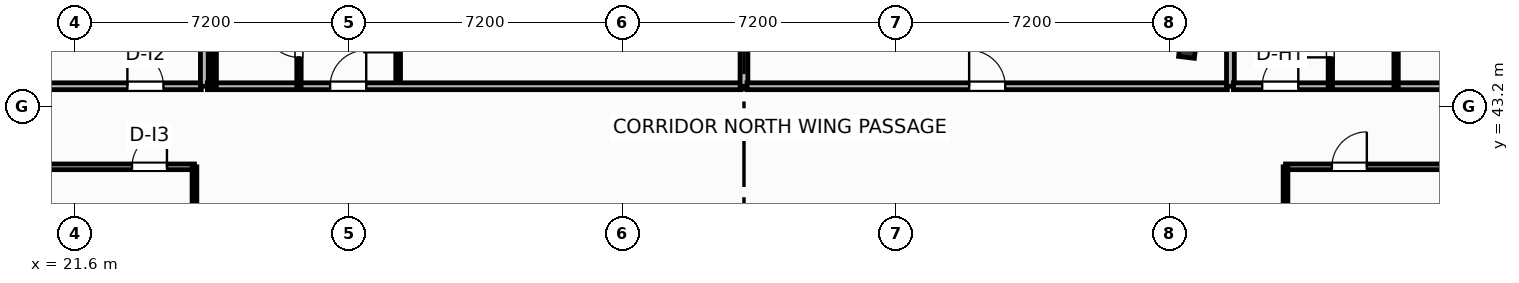
"""IFC4 building model, lengths in metres.
Left out: names, types, materials, properties, quantities, classifications, styles, units other than length and angle.
Written with IfcOpenShell. Run it as: python <this file> out.ifc"""

import sys

from ifc_helpers import new_model, si_unit, direction, frame, frame_2d, origin, origin_2d, place, context, subcontext, project, spatial, rectangle, i_section, extrude, element, fill, save


model = new_model("IFC4")
c1 = context("Model", 3, precision=1e-05, world=origin(), true_north=direction((0.0, 1.0)))
c2 = subcontext(c1, "Body", "Model", "MODEL_VIEW")
j1 = project(units=[si_unit("LENGTHUNIT", "METRE"), si_unit("PLANEANGLEUNIT", "RADIAN")], contexts=[c1])
p1 = place(None, origin())
s1 = spatial("IfcSite", under=j1, at=p1, CompositionType="ELEMENT")
p2 = place(p1, origin())
s2 = spatial("IfcBuilding", under=s1, at=p2, CompositionType="ELEMENT")
p3 = place(p2, frame((0.0, 0.0, 147.6)))
s3 = spatial("IfcBuildingStorey", under=s2, at=p3, CompositionType="ELEMENT", Elevation=147.6)
p4 = place(p3, frame((50.872, 44.717, 0.0), z_axis=(0.0, 0.0, 1.0), x_axis=(0.992732158755, -0.12034475881, 0.0)))
e1 = element("IfcColumn", 1, at=p4, inside=s3, PredefinedType="COLUMN", context=c2, shape_type="SweptSolid", body=[
    extrude(i_section(OverallWidth=0.418, OverallDepth=0.455, WebThickness=0.042, FlangeThickness=0.068, FilletRadius=0.025, at=origin_2d()), origin(), (0.0, 0.0, 1.0), 3.7),
])
p5 = place(p3, frame((73.538, 44.588, 0.0), z_axis=(0.0, 0.0, 1.0), x_axis=(-0.992733493583, 0.120333747213, 0.0)))
e2 = element("IfcWall", 2, at=p5, inside=s3, PredefinedType="SOLIDWALL", context=c2, shape_type="SweptSolid", body=[
    extrude(rectangle(XDim=21.447, YDim=0.22, at=frame_2d((10.724, 0.0))), origin(), (0.0, 0.0, 1.0), 2.73),
])
p6 = place(p5, frame((9.899, 0.0, 0.8)))
e3 = element("IfcOpeningElement", 3, at=p6, cuts=e2, PredefinedType="OPENING", context=c2, shape_type="SweptSolid", body=[
    extrude(rectangle(XDim=1.65, YDim=1.65, at=frame_2d((0.825, 0.825))), frame((0.0, 0.12, 0.0), z_axis=(0.0, -1.0, 0.0), x_axis=(1.0, 0.0, 0.0)), (0.0, 0.0, 1.0), 0.24),
])
p7 = place(p3, frame((5.0, 41.61, 0.0), z_axis=(0.0, 0.0, 1.0), x_axis=(1.0, 0.0, 0.0)))
e4 = element("IfcWall", 4, at=p7, inside=s3, PredefinedType="PARTITIONING", context=c2, shape_type="SweptSolid", body=[
    extrude(rectangle(XDim=19.74, YDim=0.15, at=frame_2d((9.87, 0.0))), origin(), (0.0, 0.0, 1.0), 3.45),
])
p8 = place(p7, frame((18.096, 0.0, 0.0)))
e5 = element("IfcOpeningElement", 5, at=p8, cuts=e4, PredefinedType="OPENING", context=c2, shape_type="SweptSolid", body=[
    extrude(rectangle(XDim=0.92, YDim=2.05, at=frame_2d((0.46, 1.025))), frame((0.0, 0.085, 0.0), z_axis=(0.0, -1.0, 0.0), x_axis=(1.0, 0.0, 0.0)), (0.0, 0.0, 1.0), 0.17),
])
p9 = place(p3, frame((24.74, 39.3, 0.0), z_axis=(0.0, 0.0, 1.0), x_axis=(0.0, 1.0, 0.0)))
e6 = element("IfcWall", 6, at=p9, inside=s3, PredefinedType="PARTITIONING", context=c2, shape_type="SweptSolid", body=[
    extrude(rectangle(XDim=2.31, YDim=0.125, at=frame_2d((1.155, 0.0))), origin(), (0.0, 0.0, 1.0), 3.45),
])
p10 = place(p3, frame((53.45, 41.61, 0.0), z_axis=(0.0, 0.0, 1.0), x_axis=(1.0, 0.0, 0.0)))
e7 = element("IfcWall", 7, at=p10, inside=s3, PredefinedType="PARTITIONING", context=c2, shape_type="SweptSolid", body=[
    extrude(rectangle(XDim=16.55, YDim=0.15, at=frame_2d((8.275, 0.0))), origin(), (0.0, 0.0, 1.0), 3.45),
])
p11 = place(p10, frame((1.22, 0.0, 0.0)))
e8 = element("IfcOpeningElement", 8, at=p11, cuts=e7, PredefinedType="OPENING", context=c2, shape_type="SweptSolid", body=[
    extrude(rectangle(XDim=0.92, YDim=2.05, at=frame_2d((0.46, 1.025))), frame((0.0, 0.085, 0.0), z_axis=(0.0, -1.0, 0.0), x_axis=(1.0, 0.0, 0.0)), (0.0, 0.0, 1.0), 0.17),
])
p12 = place(p3, frame((53.45, 39.3, 0.0), z_axis=(0.0, 0.0, 1.0), x_axis=(0.0, 1.0, 0.0)))
e9 = element("IfcWall", 9, at=p12, inside=s3, PredefinedType="PARTITIONING", context=c2, shape_type="SweptSolid", body=[
    extrude(rectangle(XDim=2.31, YDim=0.125, at=frame_2d((1.155, 0.0))), origin(), (0.0, 0.0, 1.0), 3.45),
])
p13 = place(p3, frame((4.143, 43.73, 0.0), z_axis=(0.0, 0.0, 1.0), x_axis=(1.0, 0.0, 0.0)))
e10 = element("IfcWall", 10, at=p13, inside=s3, PredefinedType="PARTITIONING", context=c2, shape_type="SweptSolid", body=[
    extrude(rectangle(XDim=20.777, YDim=0.18, at=frame_2d((10.389, 0.0))), origin(), (0.0, 0.0, 1.0), 3.45),
])
p14 = place(p13, frame((18.832, 0.0, 0.0)))
e11 = element("IfcOpeningElement", 11, at=p14, cuts=e10, PredefinedType="OPENING", context=c2, shape_type="SweptSolid", body=[
    extrude(rectangle(XDim=0.95, YDim=2.05, at=frame_2d((0.475, 1.025))), frame((0.0, 0.1, 0.0), z_axis=(0.0, -1.0, 0.0), x_axis=(1.0, 0.0, 0.0)), (0.0, 0.0, 1.0), 0.2),
])
p15 = place(p3, frame((25.0, 43.73, 0.0), z_axis=(0.0, 0.0, 1.0), x_axis=(0.0, 1.0, 0.0)))
e12 = element("IfcWall", 12, at=p15, inside=s3, PredefinedType="PARTITIONING", context=c2, shape_type="SweptSolid", body=[
    extrude(rectangle(XDim=6.722, YDim=0.205, at=frame_2d((3.361, 0.0))), origin(), (0.0, 0.0, 1.0), 3.45),
])
p16 = place(p3, frame((30.1, 43.73, 0.0), z_axis=(0.0, 0.0, 1.0), x_axis=(0.0, 1.0, 0.0)))
e13 = element("IfcWall", 13, at=p16, inside=s3, PredefinedType="PARTITIONING", context=c2, shape_type="SweptSolid", body=[
    extrude(rectangle(XDim=6.104, YDim=0.125, at=frame_2d((3.052, 0.0))), origin(), (0.0, 0.0, 1.0), 3.45),
])
p17 = place(p16, frame((0.895, 0.0, 0.0)))
e14 = element("IfcOpeningElement", 14, at=p17, cuts=e13, PredefinedType="OPENING", context=c2, shape_type="SweptSolid", body=[
    extrude(rectangle(XDim=0.92, YDim=2.05, at=frame_2d((0.46, 1.025))), frame((0.0, 0.073, 0.0), z_axis=(0.0, -1.0, 0.0), x_axis=(1.0, 0.0, 0.0)), (0.0, 0.0, 1.0), 0.145),
])
p18 = place(p3, frame((25.08, 43.73, 0.0), z_axis=(0.0, 0.0, 1.0), x_axis=(1.0, 0.0, 0.0)))
e15 = element("IfcWall", 15, at=p18, inside=s3, PredefinedType="PARTITIONING", context=c2, shape_type="SweptSolid", body=[
    extrude(rectangle(XDim=14.04, YDim=0.18, at=frame_2d((7.02, 0.0))), origin(), (0.0, 0.0, 1.0), 2.972),
])
p19 = place(p18, frame((3.23, 0.0, 0.0)))
e16 = element("IfcOpeningElement", 16, at=p19, cuts=e15, PredefinedType="OPENING", context=c2, shape_type="SweptSolid", body=[
    extrude(rectangle(XDim=0.95, YDim=2.15, at=frame_2d((0.475, 1.075))), frame((0.0, 0.1, 0.0), z_axis=(0.0, -1.0, 0.0), x_axis=(1.0, 0.0, 0.0)), (0.0, 0.0, 1.0), 0.2),
])
p20 = place(p3, frame((27.49, 43.73, 0.0), z_axis=(0.0, 0.0, 1.0), x_axis=(0.0, 1.0, 0.0)))
e17 = element("IfcWall", 17, at=p20, inside=s3, PredefinedType="PARTITIONING", context=c2, shape_type="SweptSolid", body=[
    extrude(rectangle(XDim=2.52, YDim=0.115, at=frame_2d((1.26, 0.0))), origin(), (0.0, 0.0, 1.0), 3.45),
])
p21 = place(p20, frame((0.76, 0.0, 0.0)))
e18 = element("IfcOpeningElement", 18, at=p21, cuts=e17, PredefinedType="OPENING", context=c2, shape_type="SweptSolid", body=[
    extrude(rectangle(XDim=0.9, YDim=2.05, at=frame_2d((0.45, 1.025))), frame((0.0, 0.067, 0.0), z_axis=(0.0, -1.0, 0.0), x_axis=(1.0, 0.0, 0.0)), (0.0, 0.0, 1.0), 0.135),
])
p22 = place(p3, frame((25.26, 43.73, 0.0), z_axis=(0.0, 0.0, 1.0), x_axis=(0.0, 1.0, 0.0)))
e19 = element("IfcWall", 19, at=p22, inside=s3, PredefinedType="PARTITIONING", context=c2, shape_type="SweptSolid", body=[
    extrude(rectangle(XDim=2.52, YDim=0.115, at=frame_2d((1.26, 0.0))), origin(), (0.0, 0.0, 1.0), 3.45),
])
p23 = place(p3, frame((39.2, 43.73, 0.0), z_axis=(0.0, 0.0, 1.0), x_axis=(0.0, 1.0, 0.0)))
e20 = element("IfcWall", 20, at=p23, inside=s3, PredefinedType="PARTITIONING", context=c2, shape_type="SweptSolid", body=[
    extrude(rectangle(XDim=5.0, YDim=0.205, at=frame_2d((2.5, 0.0))), origin(), (0.0, 0.0, 1.0), 3.45),
])
p24 = place(p3, frame((39.28, 43.73, 0.0), z_axis=(0.0, 0.0, 1.0), x_axis=(1.0, 0.0, 0.0)))
e21 = element("IfcWall", 21, at=p24, inside=s3, PredefinedType="PARTITIONING", context=c2, shape_type="SweptSolid", body=[
    extrude(rectangle(XDim=12.64, YDim=0.18, at=frame_2d((6.32, 0.0))), origin(), (0.0, 0.0, 1.0), 2.972),
])
p25 = place(p24, frame((5.845, 0.0, 0.0)))
e22 = element("IfcOpeningElement", 22, at=p25, cuts=e21, PredefinedType="OPENING", context=c2, shape_type="SweptSolid", body=[
    extrude(rectangle(XDim=0.95, YDim=2.05, at=frame_2d((0.475, 1.025))), frame((0.0, 0.1, 0.0), z_axis=(0.0, -1.0, 0.0), x_axis=(1.0, 0.0, 0.0)), (0.0, 0.0, 1.0), 0.2),
])
p26 = place(p3, frame((52.0, 43.73, 0.0), z_axis=(0.0, 0.0, 1.0), x_axis=(0.0, 1.0, 0.0)))
e23 = element("IfcWall", 23, at=p26, inside=s3, PredefinedType="PARTITIONING", context=c2, shape_type="SweptSolid", body=[
    extrude(rectangle(XDim=1.354, YDim=0.205, at=frame_2d((0.677, 0.0))), origin(), (0.0, 0.0, 1.0), 3.45),
])
p27 = place(p3, frame((52.08, 43.73, 0.0), z_axis=(0.0, 0.0, 1.0), x_axis=(1.0, 0.0, 0.0)))
e24 = element("IfcWall", 24, at=p27, inside=s3, PredefinedType="PARTITIONING", context=c2, shape_type="SweptSolid", body=[
    extrude(rectangle(XDim=23.689, YDim=0.18, at=frame_2d((11.845, 0.0))), origin(), (0.0, 0.0, 1.0), 2.824),
])
p28 = place(p27, frame((0.756, 0.0, 0.0)))
e25 = element("IfcOpeningElement", 25, at=p28, cuts=e24, PredefinedType="OPENING", context=c2, shape_type="SweptSolid", body=[
    extrude(rectangle(XDim=0.95, YDim=2.15, at=frame_2d((0.475, 1.075))), frame((0.0, 0.1, 0.0), z_axis=(0.0, -1.0, 0.0), x_axis=(1.0, 0.0, 0.0)), (0.0, 0.0, 1.0), 0.2),
])
p29 = place(p3, frame((54.63, 43.73, 0.0), z_axis=(0.0, 0.0, 1.0), x_axis=(0.0, 1.0, 0.0)))
e26 = element("IfcWall", 26, at=p29, inside=s3, PredefinedType="PARTITIONING", context=c2, shape_type="SweptSolid", body=[
    extrude(rectangle(XDim=2.52, YDim=0.115, at=frame_2d((1.26, 0.0))), origin(), (0.0, 0.0, 1.0), 3.45),
])
p30 = place(p29, frame((0.76, 0.0, 0.0)))
e27 = element("IfcOpeningElement", 27, at=p30, cuts=e26, PredefinedType="OPENING", context=c2, shape_type="SweptSolid", body=[
    extrude(rectangle(XDim=0.9, YDim=2.05, at=frame_2d((0.45, 1.025))), frame((0.0, 0.067, 0.0), z_axis=(0.0, -1.0, 0.0), x_axis=(1.0, 0.0, 0.0)), (0.0, 0.0, 1.0), 0.135),
])
p31 = place(p3, frame((56.36, 43.73, 0.0), z_axis=(0.0, 0.0, 1.0), x_axis=(0.0, 1.0, 0.0)))
e28 = element("IfcWall", 28, at=p31, inside=s3, PredefinedType="PARTITIONING", context=c2, shape_type="SweptSolid", body=[
    extrude(rectangle(XDim=2.52, YDim=0.115, at=frame_2d((1.26, 0.0))), origin(), (0.0, 0.0, 1.0), 3.45),
])
p32 = place(p8, origin())
e29 = element("IfcDoor", 29, at=p32, inside=s3, OperationType="SINGLE_SWING_RIGHT", PredefinedType="DOOR", context=c2, shape_type="SweptSolid", body=[
    extrude(rectangle(XDim=0.92, YDim=2.05, at=frame_2d((0.46, 1.025))), frame((0.0, 0.025, 0.0), z_axis=(0.0, -1.0, 0.0), x_axis=(1.0, 0.0, 0.0)), (0.0, 0.0, 1.0), 0.05),
])
fill(e5, e29)
p33 = place(p11, origin())
e30 = element("IfcDoor", 30, at=p33, inside=s3, OperationType="SINGLE_SWING_RIGHT", PredefinedType="DOOR", context=c2, shape_type="SweptSolid", body=[
    extrude(rectangle(XDim=0.92, YDim=2.05, at=frame_2d((0.46, 1.025))), frame((0.0, 0.025, 0.0), z_axis=(0.0, -1.0, 0.0), x_axis=(1.0, 0.0, 0.0)), (0.0, 0.0, 1.0), 0.05),
])
fill(e8, e30)
p34 = place(p14, origin())
e31 = element("IfcDoor", 31, at=p34, inside=s3, OperationType="SINGLE_SWING_LEFT", PredefinedType="DOOR", context=c2, shape_type="SweptSolid", body=[
    extrude(rectangle(XDim=0.95, YDim=2.05, at=frame_2d((0.475, 1.025))), frame((0.0, 0.025, 0.0), z_axis=(0.0, -1.0, 0.0), x_axis=(1.0, 0.0, 0.0)), (0.0, 0.0, 1.0), 0.05),
])
fill(e11, e31)
p35 = place(p17, origin())
e32 = element("IfcDoor", 32, at=p35, inside=s3, OperationType="SINGLE_SWING_LEFT", PredefinedType="DOOR", context=c2, shape_type="SweptSolid", body=[
    extrude(rectangle(XDim=0.92, YDim=2.05, at=frame_2d((0.46, 1.025))), frame((0.0, 0.025, 0.0), z_axis=(0.0, -1.0, 0.0), x_axis=(1.0, 0.0, 0.0)), (0.0, 0.0, 1.0), 0.05),
])
fill(e14, e32)
p36 = place(p19, origin())
e33 = element("IfcDoor", 33, at=p36, inside=s3, OperationType="SINGLE_SWING_RIGHT", PredefinedType="DOOR", context=c2, shape_type="SweptSolid", body=[
    extrude(rectangle(XDim=0.95, YDim=2.15, at=frame_2d((0.475, 1.075))), frame((0.0, 0.025, 0.0), z_axis=(0.0, -1.0, 0.0), x_axis=(1.0, 0.0, 0.0)), (0.0, 0.0, 1.0), 0.05),
])
fill(e16, e33)
p37 = place(p21, origin())
e34 = element("IfcDoor", 34, at=p37, inside=s3, OperationType="SINGLE_SWING_RIGHT", PredefinedType="DOOR", context=c2, shape_type="SweptSolid", body=[
    extrude(rectangle(XDim=0.9, YDim=2.05, at=frame_2d((0.45, 1.025))), frame((0.0, 0.025, 0.0), z_axis=(0.0, -1.0, 0.0), x_axis=(1.0, 0.0, 0.0)), (0.0, 0.0, 1.0), 0.05),
])
fill(e18, e34)
p38 = place(p25, origin())
e35 = element("IfcDoor", 35, at=p38, inside=s3, OperationType="SINGLE_SWING_LEFT", PredefinedType="DOOR", context=c2, shape_type="SweptSolid", body=[
    extrude(rectangle(XDim=0.95, YDim=2.05, at=frame_2d((0.475, 1.025))), frame((0.0, 0.025, 0.0), z_axis=(0.0, -1.0, 0.0), x_axis=(1.0, 0.0, 0.0)), (0.0, 0.0, 1.0), 0.05),
])
fill(e22, e35)
p39 = place(p28, origin())
e36 = element("IfcDoor", 36, at=p39, inside=s3, OperationType="SINGLE_SWING_RIGHT", PredefinedType="DOOR", context=c2, shape_type="SweptSolid", body=[
    extrude(rectangle(XDim=0.95, YDim=2.15, at=frame_2d((0.475, 1.075))), frame((0.0, 0.025, 0.0), z_axis=(0.0, -1.0, 0.0), x_axis=(1.0, 0.0, 0.0)), (0.0, 0.0, 1.0), 0.05),
])
fill(e25, e36)
p40 = place(p30, origin())
e37 = element("IfcDoor", 37, at=p40, inside=s3, OperationType="SINGLE_SWING_LEFT", PredefinedType="DOOR", context=c2, shape_type="SweptSolid", body=[
    extrude(rectangle(XDim=0.9, YDim=2.05, at=frame_2d((0.45, 1.025))), frame((0.0, 0.025, 0.0), z_axis=(0.0, -1.0, 0.0), x_axis=(1.0, 0.0, 0.0)), (0.0, 0.0, 1.0), 0.05),
])
fill(e27, e37)
save(model, sys.argv[1])
